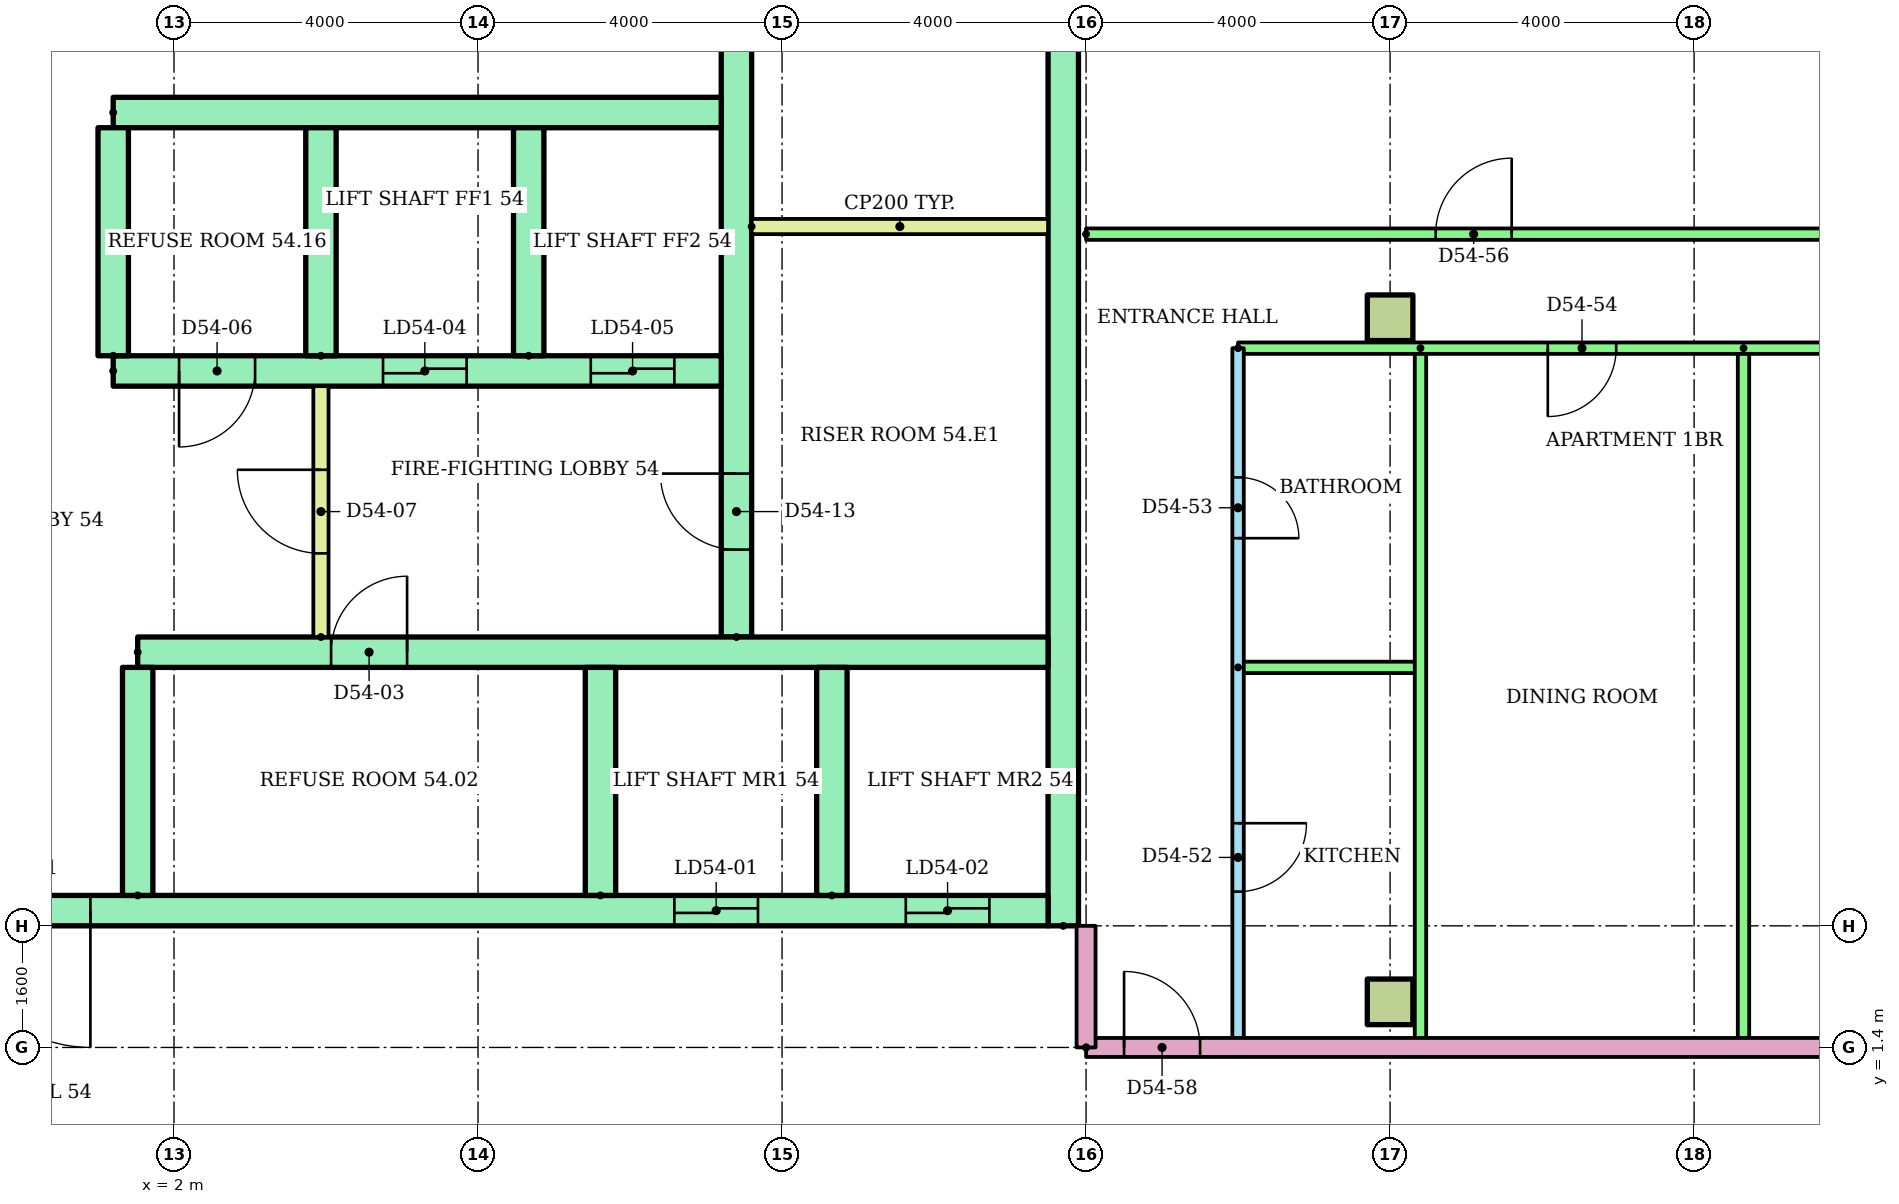
"""IFC4 building model, lengths in metres.
Left out: names, types, materials, properties, quantities, classifications, styles, units other than length and angle.
Written with IfcOpenShell. Run it as: python <this file> out.ifc"""

import sys

from ifc_helpers import new_model, si_unit, direction, frame, frame_2d, origin, origin_2d, place, context, subcontext, project, spatial, rectangle, extrude, element, fill, save


model = new_model("IFC4")
c1 = context("Model", 3, precision=1e-05, world=origin(), true_north=direction((0.0, 1.0)))
c2 = subcontext(c1, "Body", "Model", "MODEL_VIEW")
j1 = project(units=[si_unit("LENGTHUNIT", "METRE"), si_unit("PLANEANGLEUNIT", "RADIAN")], contexts=[c1])
p1 = place(None, origin())
s1 = spatial("IfcSite", under=j1, at=p1, CompositionType="ELEMENT")
p2 = place(p1, origin())
s2 = spatial("IfcBuilding", under=s1, at=p2, CompositionType="ELEMENT")
p3 = place(p2, frame((0.0, 0.0, 210.8)))
s3 = spatial("IfcBuildingStorey", under=s2, at=p3, CompositionType="ELEMENT", Elevation=210.8)
for number, where in (
    (1, (18.0, 2.0, 0.0)),
    (2, (18.0, 11.0, 0.0)),
):
    element("IfcColumn", number, at=place(p3, frame(where)), inside=s3, PredefinedType="COLUMN", context=c2, shape_type="SweptSolid", body=[
        extrude(rectangle(XDim=0.6, YDim=0.6, at=origin_2d()), origin(), (0.0, 0.0, 1.0), 3.2),
    ])
p4 = place(p3, frame((13.7, 3.0, 0.0), z_axis=(0.0, 0.0, 1.0), x_axis=(0.0, 1.0, 0.0)))
e3 = element("IfcWall", 3, at=p4, inside=s3, PredefinedType="SHEAR", context=c2, shape_type="SweptSolid", body=[
    extrude(rectangle(XDim=17.0, YDim=0.4, at=frame_2d((8.5, 0.0))), origin(), (0.0, 0.0, 1.0), 2.92),
])
p5 = place(p3, frame((9.4, 6.8, 0.0), z_axis=(0.0, 0.0, 1.0), x_axis=(0.0, 1.0, 0.0)))
e4 = element("IfcWall", 4, at=p5, inside=s3, PredefinedType="SHEAR", context=c2, shape_type="SweptSolid", body=[
    extrude(rectangle(XDim=12.7, YDim=0.4, at=frame_2d((6.35, 0.0))), origin(), (0.0, 0.0, 1.0), 2.92),
])
p6 = place(p5, frame((1.15, 0.0, 0.0)))
e5 = element("IfcOpeningElement", 5, at=p6, cuts=e4, PredefinedType="OPENING", context=c2, shape_type="SweptSolid", body=[
    extrude(rectangle(XDim=1.0, YDim=2.1, at=frame_2d((0.5, 1.05))), frame((0.0, 0.21, 0.0), z_axis=(0.0, -1.0, 0.0), x_axis=(1.0, 0.0, 0.0)), (0.0, 0.0, 1.0), 0.42),
])
p7 = place(p5, frame((7.925, 0.0, 0.0)))
e6 = element("IfcOpeningElement", 6, at=p7, cuts=e4, PredefinedType="OPENING", context=c2, shape_type="SweptSolid", body=[
    extrude(rectangle(XDim=1.0, YDim=2.1, at=frame_2d((0.5, 1.05))), frame((0.0, 0.21, 0.0), z_axis=(0.0, -1.0, 0.0), x_axis=(1.0, 0.0, 0.0)), (0.0, 0.0, 1.0), 0.42),
])
p8 = place(p3, frame((-13.5, 3.2, 0.0)))
e7 = element("IfcWall", 7, at=p8, inside=s3, PredefinedType="SHEAR", context=c2, shape_type="SweptSolid", body=[
    extrude(rectangle(XDim=27.0, YDim=0.4, at=frame_2d((13.5, 0.0))), origin(), (0.0, 0.0, 1.0), 2.92),
])
p9 = place(p8, frame((22.083, 0.0, 0.0)))
e8 = element("IfcOpeningElement", 8, at=p9, cuts=e7, PredefinedType="OPENING", context=c2, shape_type="SweptSolid", body=[
    extrude(rectangle(XDim=1.1, YDim=2.1, at=frame_2d((0.55, 1.05))), frame((0.0, 0.21, 0.0), z_axis=(0.0, -1.0, 0.0), x_axis=(1.0, 0.0, 0.0)), (0.0, 0.0, 1.0), 0.42),
])
p10 = place(p8, frame((25.128, 0.0, 0.0)))
e9 = element("IfcOpeningElement", 9, at=p10, cuts=e7, PredefinedType="OPENING", context=c2, shape_type="SweptSolid", body=[
    extrude(rectangle(XDim=1.1, YDim=2.1, at=frame_2d((0.55, 1.05))), frame((0.0, 0.21, 0.0), z_axis=(0.0, -1.0, 0.0), x_axis=(1.0, 0.0, 0.0)), (0.0, 0.0, 1.0), 0.42),
])
p11 = place(p8, frame((12.6, 0.0, 0.0)))
e10 = element("IfcOpeningElement", 10, at=p11, cuts=e7, PredefinedType="OPENING", context=c2, shape_type="SweptSolid", body=[
    extrude(rectangle(XDim=1.8, YDim=2.1, at=frame_2d((0.9, 1.05))), frame((0.0, 0.21, 0.0), z_axis=(0.0, -1.0, 0.0), x_axis=(1.0, 0.0, 0.0)), (0.0, 0.0, 1.0), 0.42),
])
p12 = place(p3, frame((1.522, 6.6, 0.0)))
e11 = element("IfcWall", 11, at=p12, inside=s3, PredefinedType="SHEAR", context=c2, shape_type="SweptSolid", body=[
    extrude(rectangle(XDim=11.978, YDim=0.4, at=frame_2d((5.989, 0.0))), origin(), (0.0, 0.0, 1.0), 2.92),
])
p13 = place(p12, frame((2.544, 0.0, 0.0)))
e12 = element("IfcOpeningElement", 12, at=p13, cuts=e11, PredefinedType="OPENING", context=c2, shape_type="SweptSolid", body=[
    extrude(rectangle(XDim=1.0, YDim=2.1, at=frame_2d((0.5, 1.05))), frame((0.0, 0.21, 0.0), z_axis=(0.0, -1.0, 0.0), x_axis=(1.0, 0.0, 0.0)), (0.0, 0.0, 1.0), 0.42),
])
for number, where, z_axis, x_axis in (
    (13, (1.522, 3.4, 0.0), (0.0, 0.0, 1.0), (0.0, 1.0, 0.0)),
    (14, (7.611, 3.4, 0.0), (0.0, 0.0, 1.0), (0.0, 1.0, 0.0)),
    (15, (10.656, 3.4, 0.0), (0.0, 0.0, 1.0), (0.0, 1.0, 0.0)),
):
    element("IfcWall", number, at=place(p3, frame(where, z_axis=z_axis, x_axis=x_axis)), inside=s3, PredefinedType="SHEAR", context=c2, shape_type="SweptSolid", body=[
        extrude(rectangle(XDim=3.0, YDim=0.4, at=frame_2d((1.5, 0.0))), origin(), (0.0, 0.0, 1.0), 2.92),
    ])
p14 = place(p3, frame((1.2, 10.3, 0.0)))
e16 = element("IfcWall", 16, at=p14, inside=s3, PredefinedType="SHEAR", context=c2, shape_type="SweptSolid", body=[
    extrude(rectangle(XDim=8.0, YDim=0.4, at=frame_2d((4.0, 0.0))), origin(), (0.0, 0.0, 1.0), 2.92),
])
p15 = place(p14, frame((3.55, 0.0, 0.0)))
e17 = element("IfcOpeningElement", 17, at=p15, cuts=e16, PredefinedType="OPENING", context=c2, shape_type="SweptSolid", body=[
    extrude(rectangle(XDim=1.1, YDim=2.1, at=frame_2d((0.55, 1.05))), frame((0.0, 0.21, 0.0), z_axis=(0.0, -1.0, 0.0), x_axis=(1.0, 0.0, 0.0)), (0.0, 0.0, 1.0), 0.42),
])
p16 = place(p14, frame((6.283, 0.0, 0.0)))
e18 = element("IfcOpeningElement", 18, at=p16, cuts=e16, PredefinedType="OPENING", context=c2, shape_type="SweptSolid", body=[
    extrude(rectangle(XDim=1.1, YDim=2.1, at=frame_2d((0.55, 1.05))), frame((0.0, 0.21, 0.0), z_axis=(0.0, -1.0, 0.0), x_axis=(1.0, 0.0, 0.0)), (0.0, 0.0, 1.0), 0.42),
])
p17 = place(p14, frame((0.867, 0.0, 0.0)))
e19 = element("IfcOpeningElement", 19, at=p17, cuts=e16, PredefinedType="OPENING", context=c2, shape_type="SweptSolid", body=[
    extrude(rectangle(XDim=1.0, YDim=2.1, at=frame_2d((0.5, 1.05))), frame((0.0, 0.21, 0.0), z_axis=(0.0, -1.0, 0.0), x_axis=(1.0, 0.0, 0.0)), (0.0, 0.0, 1.0), 0.42),
])
p18 = place(p3, frame((1.2, 13.7, 0.0)))
e20 = element("IfcWall", 20, at=p18, inside=s3, PredefinedType="SHEAR", context=c2, shape_type="SweptSolid", body=[
    extrude(rectangle(XDim=8.0, YDim=0.4, at=frame_2d((4.0, 0.0))), origin(), (0.0, 0.0, 1.0), 2.92),
])
for number, where, z_axis, x_axis in (
    (21, (1.2, 10.5, 0.0), (0.0, 0.0, 1.0), (0.0, 1.0, 0.0)),
    (22, (3.933, 10.5, 0.0), (0.0, 0.0, 1.0), (0.0, 1.0, 0.0)),
    (23, (6.667, 10.5, 0.0), (0.0, 0.0, 1.0), (0.0, 1.0, 0.0)),
):
    element("IfcWall", number, at=place(p3, frame(where, z_axis=z_axis, x_axis=x_axis)), inside=s3, PredefinedType="SHEAR", context=c2, shape_type="SweptSolid", body=[
        extrude(rectangle(XDim=3.0, YDim=0.4, at=frame_2d((1.5, 0.0))), origin(), (0.0, 0.0, 1.0), 2.92),
    ])
p19 = place(p3, frame((3.933, 6.8, 0.0), z_axis=(0.0, 0.0, 1.0), x_axis=(0.0, 1.0, 0.0)))
e24 = element("IfcWall", 24, at=p19, inside=s3, PredefinedType="PARTITIONING", context=c2, shape_type="SweptSolid", body=[
    extrude(rectangle(XDim=3.3, YDim=0.2, at=frame_2d((1.65, 0.0))), origin(), (0.0, 0.0, 1.0), 2.92),
])
p20 = place(p19, frame((1.1, 0.0, 0.0)))
e25 = element("IfcOpeningElement", 25, at=p20, cuts=e24, PredefinedType="OPENING", context=c2, shape_type="SweptSolid", body=[
    extrude(rectangle(XDim=1.1, YDim=2.1, at=frame_2d((0.55, 1.05))), frame((0.0, 0.11, 0.0), z_axis=(0.0, -1.0, 0.0), x_axis=(1.0, 0.0, 0.0)), (0.0, 0.0, 1.0), 0.22),
])
p21 = place(p3, frame((9.6, 12.2, 0.0)))
e26 = element("IfcWall", 26, at=p21, inside=s3, PredefinedType="PARTITIONING", context=c2, shape_type="SweptSolid", body=[
    extrude(rectangle(XDim=3.9, YDim=0.2, at=frame_2d((1.95, 0.0))), origin(), (0.0, 0.0, 1.0), 2.92),
])
p22 = place(p3, frame((16.0, 10.6, 0.0), z_axis=(0.0, 0.0, 1.0), x_axis=(0.0, -1.0, 0.0)))
e27 = element("IfcWall", 27, at=p22, inside=s3, PredefinedType="PARTITIONING", context=c2, shape_type="SweptSolid", body=[
    extrude(rectangle(XDim=9.2, YDim=0.15, at=frame_2d((4.6, 0.0))), origin(), (0.0, 0.0, 1.0), 2.4),
])
p23 = place(p22, frame((6.25, 0.0, 0.0)))
e28 = element("IfcOpeningElement", 28, at=p23, cuts=e27, PredefinedType="OPENING", context=c2, shape_type="SweptSolid", body=[
    extrude(rectangle(XDim=0.9, YDim=2.1, at=frame_2d((0.45, 1.05))), frame((0.0, 0.085, 0.0), z_axis=(0.0, -1.0, 0.0), x_axis=(1.0, 0.0, 0.0)), (0.0, 0.0, 1.0), 0.17),
])
p24 = place(p22, frame((1.7, 0.0, 0.0)))
e29 = element("IfcOpeningElement", 29, at=p24, cuts=e27, PredefinedType="OPENING", context=c2, shape_type="SweptSolid", body=[
    extrude(rectangle(XDim=0.8, YDim=2.1, at=frame_2d((0.4, 1.05))), frame((0.0, 0.085, 0.0), z_axis=(0.0, -1.0, 0.0), x_axis=(1.0, 0.0, 0.0)), (0.0, 0.0, 1.0), 0.17),
])
p25 = place(p3, frame((16.0, 6.4, 0.0)))
e30 = element("IfcWall", 30, at=p25, inside=s3, PredefinedType="PARTITIONING", context=c2, shape_type="SweptSolid", body=[
    extrude(rectangle(XDim=2.4, YDim=0.15, at=frame_2d((1.2, 0.0))), origin(), (0.0, 0.0, 1.0), 2.4),
])
for number, where, z_axis, x_axis in (
    (31, (18.4, 10.6, 0.0), (0.0, 0.0, 1.0), (0.0, -1.0, 0.0)),
    (32, (22.65, 10.6, 0.0), (0.0, 0.0, 1.0), (0.0, -1.0, 0.0)),
):
    element("IfcWall", number, at=place(p3, frame(where, z_axis=z_axis, x_axis=x_axis)), inside=s3, PredefinedType="PARTITIONING", context=c2, shape_type="SweptSolid", body=[
        extrude(rectangle(XDim=9.2, YDim=0.15, at=frame_2d((4.6, 0.0))), origin(), (0.0, 0.0, 1.0), 2.4),
    ])
p26 = place(p3, frame((28.91, 10.6, 0.0), z_axis=(0.0, 0.0, 1.0), x_axis=(-1.0, 0.0, 0.0)))
e33 = element("IfcWall", 33, at=p26, inside=s3, PredefinedType="PARTITIONING", context=c2, shape_type="SweptSolid", body=[
    extrude(rectangle(XDim=12.91, YDim=0.15, at=frame_2d((6.455, 0.0))), origin(), (0.0, 0.0, 1.0), 2.4),
])
p27 = place(p26, frame((7.935, 0.0, 0.0)))
e34 = element("IfcOpeningElement", 34, at=p27, cuts=e33, PredefinedType="OPENING", context=c2, shape_type="SweptSolid", body=[
    extrude(rectangle(XDim=0.9, YDim=2.1, at=frame_2d((0.45, 1.05))), frame((0.0, 0.085, 0.0), z_axis=(0.0, -1.0, 0.0), x_axis=(1.0, 0.0, 0.0)), (0.0, 0.0, 1.0), 0.17),
])
p28 = place(p26, frame((3.386, 0.0, 0.0)))
e35 = element("IfcOpeningElement", 35, at=p28, cuts=e33, PredefinedType="OPENING", context=c2, shape_type="SweptSolid", body=[
    extrude(rectangle(XDim=0.9, YDim=2.1, at=frame_2d((0.45, 1.05))), frame((0.0, 0.085, 0.0), z_axis=(0.0, -1.0, 0.0), x_axis=(1.0, 0.0, 0.0)), (0.0, 0.0, 1.0), 0.17),
])
p29 = place(p3, frame((14.0, 12.1, 0.0)))
e36 = element("IfcWall", 36, at=p29, inside=s3, PredefinedType="PARTITIONING", context=c2, shape_type="SweptSolid", body=[
    extrude(rectangle(XDim=14.92, YDim=0.15, at=frame_2d((7.46, 0.0))), origin(), (0.0, 0.0, 1.0), 2.4),
])
p30 = place(p29, frame((4.6, 0.0, 0.0)))
e37 = element("IfcOpeningElement", 37, at=p30, cuts=e36, PredefinedType="OPENING", context=c2, shape_type="SweptSolid", body=[
    extrude(rectangle(XDim=1.0, YDim=2.1, at=frame_2d((0.5, 1.05))), frame((0.0, 0.085, 0.0), z_axis=(0.0, -1.0, 0.0), x_axis=(1.0, 0.0, 0.0)), (0.0, 0.0, 1.0), 0.17),
])
p31 = place(p29, frame((12.476, 0.0, 0.0)))
e38 = element("IfcOpeningElement", 38, at=p31, cuts=e36, PredefinedType="OPENING", context=c2, shape_type="SweptSolid", body=[
    extrude(rectangle(XDim=0.9, YDim=2.1, at=frame_2d((0.45, 1.05))), frame((0.0, 0.085, 0.0), z_axis=(0.0, -1.0, 0.0), x_axis=(1.0, 0.0, 0.0)), (0.0, 0.0, 1.0), 0.17),
])
p32 = place(p3, frame((14.0, 1.4, 0.0)))
e39 = element("IfcWall", 39, at=p32, inside=s3, PredefinedType="PARTITIONING", context=c2, shape_type="SweptSolid", body=[
    extrude(rectangle(XDim=14.92, YDim=0.25, at=frame_2d((7.46, 0.0))), origin(), (0.0, 0.0, 1.0), 2.4),
])
p33 = place(p32, frame((0.5, 0.0, 0.0)))
e40 = element("IfcOpeningElement", 40, at=p33, cuts=e39, PredefinedType="OPENING", context=c2, shape_type="SweptSolid", body=[
    extrude(rectangle(XDim=1.0, YDim=2.1, at=frame_2d((0.5, 1.05))), frame((0.0, 0.135, 0.0), z_axis=(0.0, -1.0, 0.0), x_axis=(1.0, 0.0, 0.0)), (0.0, 0.0, 1.0), 0.27),
])
p34 = place(p3, frame((14.0, 1.4, 0.0), z_axis=(0.0, 0.0, 1.0), x_axis=(0.0, 1.0, 0.0)))
e41 = element("IfcWall", 41, at=p34, inside=s3, PredefinedType="PARTITIONING", context=c2, shape_type="SweptSolid", body=[
    extrude(rectangle(XDim=1.6, YDim=0.25, at=frame_2d((0.8, 0.0))), origin(), (0.0, 0.0, 1.0), 2.4),
])
p35 = place(p9, origin())
e42 = element("IfcDoor", 42, at=p35, inside=s3, OperationType="SLIDING_TO_LEFT", PredefinedType="DOOR", context=c2, shape_type="SweptSolid", body=[
    extrude(rectangle(XDim=1.1, YDim=2.1, at=frame_2d((0.55, 1.05))), frame((0.0, 0.025, 0.0), z_axis=(0.0, -1.0, 0.0), x_axis=(1.0, 0.0, 0.0)), (0.0, 0.0, 1.0), 0.05),
])
fill(e8, e42)
p36 = place(p10, origin())
e43 = element("IfcDoor", 43, at=p36, inside=s3, OperationType="SLIDING_TO_LEFT", PredefinedType="DOOR", context=c2, shape_type="SweptSolid", body=[
    extrude(rectangle(XDim=1.1, YDim=2.1, at=frame_2d((0.55, 1.05))), frame((0.0, 0.025, 0.0), z_axis=(0.0, -1.0, 0.0), x_axis=(1.0, 0.0, 0.0)), (0.0, 0.0, 1.0), 0.05),
])
fill(e9, e43)
p37 = place(p11, frame((1.8, 0.0, 0.0), z_axis=(0.0, 0.0, 1.0), x_axis=(-1.0, 0.0, 0.0)))
e44 = element("IfcDoor", 44, at=p37, inside=s3, OperationType="DOUBLE_DOOR_SINGLE_SWING", PredefinedType="DOOR", context=c2, shape_type="SweptSolid", body=[
    extrude(rectangle(XDim=1.8, YDim=2.1, at=frame_2d((0.9, 1.05))), frame((0.0, 0.025, 0.0), z_axis=(0.0, -1.0, 0.0), x_axis=(1.0, 0.0, 0.0)), (0.0, 0.0, 1.0), 0.05),
])
fill(e10, e44)
p38 = place(p13, origin())
e45 = element("IfcDoor", 45, at=p38, inside=s3, OperationType="SINGLE_SWING_RIGHT", PredefinedType="DOOR", context=c2, shape_type="SweptSolid", body=[
    extrude(rectangle(XDim=1.0, YDim=2.1, at=frame_2d((0.5, 1.05))), frame((0.0, 0.025, 0.0), z_axis=(0.0, -1.0, 0.0), x_axis=(1.0, 0.0, 0.0)), (0.0, 0.0, 1.0), 0.05),
])
fill(e12, e45)
p39 = place(p15, origin())
e46 = element("IfcDoor", 46, at=p39, inside=s3, OperationType="SLIDING_TO_LEFT", PredefinedType="DOOR", context=c2, shape_type="SweptSolid", body=[
    extrude(rectangle(XDim=1.1, YDim=2.1, at=frame_2d((0.55, 1.05))), frame((0.0, 0.025, 0.0), z_axis=(0.0, -1.0, 0.0), x_axis=(1.0, 0.0, 0.0)), (0.0, 0.0, 1.0), 0.05),
])
fill(e17, e46)
p40 = place(p16, origin())
e47 = element("IfcDoor", 47, at=p40, inside=s3, OperationType="SLIDING_TO_LEFT", PredefinedType="DOOR", context=c2, shape_type="SweptSolid", body=[
    extrude(rectangle(XDim=1.1, YDim=2.1, at=frame_2d((0.55, 1.05))), frame((0.0, 0.025, 0.0), z_axis=(0.0, -1.0, 0.0), x_axis=(1.0, 0.0, 0.0)), (0.0, 0.0, 1.0), 0.05),
])
fill(e18, e47)
p41 = place(p17, frame((1.0, 0.0, 0.0), z_axis=(0.0, 0.0, 1.0), x_axis=(-1.0, 0.0, 0.0)))
e48 = element("IfcDoor", 48, at=p41, inside=s3, OperationType="SINGLE_SWING_LEFT", PredefinedType="DOOR", context=c2, shape_type="SweptSolid", body=[
    extrude(rectangle(XDim=1.0, YDim=2.1, at=frame_2d((0.5, 1.05))), frame((0.0, 0.025, 0.0), z_axis=(0.0, -1.0, 0.0), x_axis=(1.0, 0.0, 0.0)), (0.0, 0.0, 1.0), 0.05),
])
fill(e19, e48)
p42 = place(p20, origin())
e49 = element("IfcDoor", 49, at=p42, inside=s3, OperationType="SINGLE_SWING_RIGHT", PredefinedType="DOOR", context=c2, shape_type="SweptSolid", body=[
    extrude(rectangle(XDim=1.1, YDim=2.1, at=frame_2d((0.55, 1.05))), frame((0.0, 0.025, 0.0), z_axis=(0.0, -1.0, 0.0), x_axis=(1.0, 0.0, 0.0)), (0.0, 0.0, 1.0), 0.05),
])
fill(e25, e49)
p43 = place(p6, origin())
e50 = element("IfcDoor", 50, at=p43, inside=s3, OperationType="SINGLE_SWING_RIGHT", PredefinedType="DOOR", context=c2, shape_type="SweptSolid", body=[
    extrude(rectangle(XDim=1.0, YDim=2.1, at=frame_2d((0.5, 1.05))), frame((0.0, 0.025, 0.0), z_axis=(0.0, -1.0, 0.0), x_axis=(1.0, 0.0, 0.0)), (0.0, 0.0, 1.0), 0.05),
])
fill(e5, e50)
p44 = place(p23, origin())
e51 = element("IfcDoor", 51, at=p44, inside=s3, OperationType="SINGLE_SWING_LEFT", PredefinedType="DOOR", context=c2, shape_type="SweptSolid", body=[
    extrude(rectangle(XDim=0.9, YDim=2.1, at=frame_2d((0.45, 1.05))), frame((0.0, 0.025, 0.0), z_axis=(0.0, -1.0, 0.0), x_axis=(1.0, 0.0, 0.0)), (0.0, 0.0, 1.0), 0.05),
])
fill(e28, e51)
p45 = place(p24, origin())
e52 = element("IfcDoor", 52, at=p45, inside=s3, OperationType="SINGLE_SWING_RIGHT", PredefinedType="DOOR", context=c2, shape_type="SweptSolid", body=[
    extrude(rectangle(XDim=0.8, YDim=2.1, at=frame_2d((0.4, 1.05))), frame((0.0, 0.025, 0.0), z_axis=(0.0, -1.0, 0.0), x_axis=(1.0, 0.0, 0.0)), (0.0, 0.0, 1.0), 0.05),
])
fill(e29, e52)
p46 = place(p27, origin())
e53 = element("IfcDoor", 53, at=p46, inside=s3, OperationType="SINGLE_SWING_RIGHT", PredefinedType="DOOR", context=c2, shape_type="SweptSolid", body=[
    extrude(rectangle(XDim=0.9, YDim=2.1, at=frame_2d((0.45, 1.05))), frame((0.0, 0.025, 0.0), z_axis=(0.0, -1.0, 0.0), x_axis=(1.0, 0.0, 0.0)), (0.0, 0.0, 1.0), 0.05),
])
fill(e34, e53)
p47 = place(p30, origin())
e54 = element("IfcDoor", 54, at=p47, inside=s3, OperationType="SINGLE_SWING_RIGHT", PredefinedType="DOOR", context=c2, shape_type="SweptSolid", body=[
    extrude(rectangle(XDim=1.0, YDim=2.1, at=frame_2d((0.5, 1.05))), frame((0.0, 0.025, 0.0), z_axis=(0.0, -1.0, 0.0), x_axis=(1.0, 0.0, 0.0)), (0.0, 0.0, 1.0), 0.05),
])
fill(e37, e54)
p48 = place(p33, origin())
e55 = element("IfcDoor", 55, at=p48, inside=s3, OperationType="SINGLE_SWING_LEFT", PredefinedType="DOOR", context=c2, shape_type="SweptSolid", body=[
    extrude(rectangle(XDim=1.0, YDim=2.1, at=frame_2d((0.5, 1.05))), frame((0.0, 0.025, 0.0), z_axis=(0.0, -1.0, 0.0), x_axis=(1.0, 0.0, 0.0)), (0.0, 0.0, 1.0), 0.05),
])
fill(e40, e55)
save(model, sys.argv[1])
